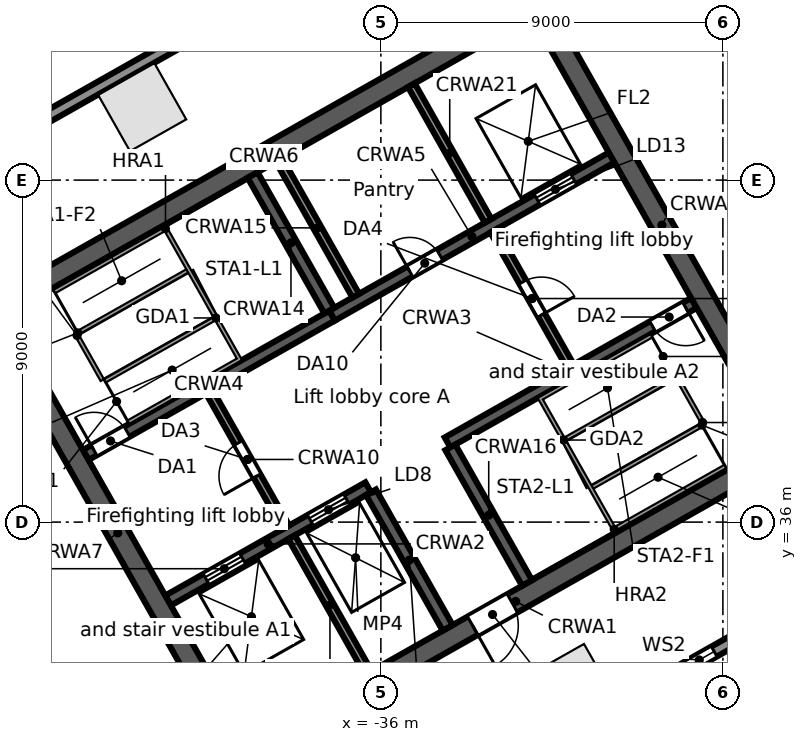
"""IFC4 building model, lengths in metres.
Left out: names, types, materials, properties, quantities, classifications, styles, units other than length and angle.
Written with IfcOpenShell. Run it as: python <this file> out.ifc"""

import sys

from ifc_helpers import new_model, si_unit, direction, frame, frame_2d, origin, origin_2d, place, context, subcontext, project, spatial, rectangle, extrude, element, fill, save


model = new_model("IFC4")
c1 = context("Model", 3, precision=1e-05, world=origin(), true_north=direction((0.0, 1.0)))
c2 = subcontext(c1, "Body", "Model", "MODEL_VIEW")
j1 = project(units=[si_unit("LENGTHUNIT", "METRE"), si_unit("PLANEANGLEUNIT", "RADIAN")], contexts=[c1])
p1 = place(None, origin())
s1 = spatial("IfcSite", under=j1, at=p1, CompositionType="ELEMENT")
p2 = place(p1, origin())
s2 = spatial("IfcBuilding", under=s1, at=p2, CompositionType="ELEMENT")
p3 = place(p2, frame((0.0, 0.0, 97.1)))
s3 = spatial("IfcBuildingStorey", under=s2, at=p3, CompositionType="ELEMENT", Elevation=97.1)
for number, where, z_axis, x_axis in (
    (1, (-42.28, 46.919, 0.0), (0.0, 0.0, 1.0), (-0.87, -0.492, 0.0)),
    (2, (-30.976, 31.635, 0.0), (0.0, 0.0, 1.0), (0.87, 0.492, 0.0)),
):
    element("IfcColumn", number, at=place(p3, frame(where, z_axis=z_axis, x_axis=x_axis)), inside=s3, PredefinedType="COLUMN", context=c2, shape_type="SweptSolid", body=[
        extrude(rectangle(XDim=1.7, YDim=1.7, at=origin_2d()), origin(), (0.0, 0.0, 1.0), 4.4),
    ])
p4 = place(p3, frame((-58.745, 38.764, 0.0), z_axis=(0.0, 0.0, 1.0), x_axis=(0.870355811726, 0.492423355453, 0.0)))
e3 = element("IfcWall", 3, at=p4, inside=s3, PredefinedType="STANDARD", context=c2, shape_type="SweptSolid", body=[
    extrude(rectangle(XDim=64.025, YDim=0.3, at=frame_2d((32.013, 0.0))), origin(), (0.0, 0.0, 1.0), 4.08),
])
p5 = place(p4, frame((60.122, 0.0, 0.6)))
e4 = element("IfcOpeningElement", 4, at=p5, cuts=e3, PredefinedType="OPENING", context=c2, shape_type="SweptSolid", body=[
    extrude(rectangle(XDim=0.9, YDim=2.8, at=frame_2d((0.45, 1.4))), frame((0.0, 0.16, 0.0), z_axis=(0.0, -1.0, 0.0), x_axis=(1.0, 0.0, 0.0)), (0.0, 0.0, 1.0), 0.32),
])
p6 = place(p4, frame((50.992, 0.0, 0.6)))
e5 = element("IfcOpeningElement", 5, at=p6, cuts=e3, PredefinedType="OPENING", context=c2, shape_type="SweptSolid", body=[
    extrude(rectangle(XDim=0.9, YDim=2.8, at=frame_2d((0.45, 1.4))), frame((0.0, 0.16, 0.0), z_axis=(0.0, -1.0, 0.0), x_axis=(1.0, 0.0, 0.0)), (0.0, 0.0, 1.0), 0.32),
])
p7 = place(p4, frame((41.862, 0.0, 0.6)))
e6 = element("IfcOpeningElement", 6, at=p7, cuts=e3, PredefinedType="OPENING", context=c2, shape_type="SweptSolid", body=[
    extrude(rectangle(XDim=0.9, YDim=2.8, at=frame_2d((0.45, 1.4))), frame((0.0, 0.16, 0.0), z_axis=(0.0, -1.0, 0.0), x_axis=(1.0, 0.0, 0.0)), (0.0, 0.0, 1.0), 0.32),
])
p8 = place(p4, frame((32.732, 0.0, 0.6)))
e7 = element("IfcOpeningElement", 7, at=p8, cuts=e3, PredefinedType="OPENING", context=c2, shape_type="SweptSolid", body=[
    extrude(rectangle(XDim=0.9, YDim=2.8, at=frame_2d((0.45, 1.4))), frame((0.0, 0.16, 0.0), z_axis=(0.0, -1.0, 0.0), x_axis=(1.0, 0.0, 0.0)), (0.0, 0.0, 1.0), 0.32),
])
p9 = place(p4, frame((23.602, 0.0, 0.6)))
e8 = element("IfcOpeningElement", 8, at=p9, cuts=e3, PredefinedType="OPENING", context=c2, shape_type="SweptSolid", body=[
    extrude(rectangle(XDim=0.9, YDim=2.8, at=frame_2d((0.45, 1.4))), frame((0.0, 0.16, 0.0), z_axis=(0.0, -1.0, 0.0), x_axis=(1.0, 0.0, 0.0)), (0.0, 0.0, 1.0), 0.32),
])
p10 = place(p4, frame((14.472, 0.0, 0.6)))
e9 = element("IfcOpeningElement", 9, at=p10, cuts=e3, PredefinedType="OPENING", context=c2, shape_type="SweptSolid", body=[
    extrude(rectangle(XDim=0.9, YDim=2.8, at=frame_2d((0.45, 1.4))), frame((0.0, 0.16, 0.0), z_axis=(0.0, -1.0, 0.0), x_axis=(1.0, 0.0, 0.0)), (0.0, 0.0, 1.0), 0.32),
])
p11 = place(p4, frame((5.342, 0.0, 0.6)))
e10 = element("IfcOpeningElement", 10, at=p11, cuts=e3, PredefinedType="OPENING", context=c2, shape_type="SweptSolid", body=[
    extrude(rectangle(XDim=0.9, YDim=2.8, at=frame_2d((0.45, 1.4))), frame((0.0, 0.16, 0.0), z_axis=(0.0, -1.0, 0.0), x_axis=(1.0, 0.0, 0.0)), (0.0, 0.0, 1.0), 0.32),
])
p12 = place(p3, frame((-44.109, 26.504, 0.0), z_axis=(0.0, 0.0, 1.0), x_axis=(-0.857169502585, 0.515034410344, 0.0)))
e11 = element("IfcWall", 11, at=p12, inside=s3, PredefinedType="STANDARD", context=c2, shape_type="SweptSolid", body=[
    extrude(rectangle(XDim=17.127, YDim=0.3, at=frame_2d((8.563, 0.0))), origin(), (0.0, 0.0, 1.0), 4.08),
])
p13 = place(p12, frame((13.403, 0.0, 0.6)))
e12 = element("IfcOpeningElement", 12, at=p13, cuts=e11, PredefinedType="OPENING", context=c2, shape_type="SweptSolid", body=[
    extrude(rectangle(XDim=0.9, YDim=2.8, at=frame_2d((0.45, 1.4))), frame((0.0, 0.16, 0.0), z_axis=(0.0, -1.0, 0.0), x_axis=(1.0, 0.0, 0.0)), (0.0, 0.0, 1.0), 0.32),
])
p14 = place(p12, frame((4.903, 0.0, 0.6)))
e13 = element("IfcOpeningElement", 13, at=p14, cuts=e11, PredefinedType="OPENING", context=c2, shape_type="SweptSolid", body=[
    extrude(rectangle(XDim=0.9, YDim=2.8, at=frame_2d((0.45, 1.4))), frame((0.0, 0.16, 0.0), z_axis=(0.0, -1.0, 0.0), x_axis=(1.0, 0.0, 0.0)), (0.0, 0.0, 1.0), 0.32),
])
p15 = place(p3, frame((-0.055, 47.969, 0.0), z_axis=(0.0, 0.0, 1.0), x_axis=(-0.870355730478, -0.492423499058, 0.0)))
e14 = element("IfcWall", 14, at=p15, inside=s3, PredefinedType="STANDARD", context=c2, shape_type="SweptSolid", body=[
    extrude(rectangle(XDim=43.75, YDim=0.3, at=frame_2d((21.875, 0.0))), origin(), (0.0, 0.0, 1.0), 4.08),
])
p16 = place(p15, frame((39.977, 0.0, 0.6)))
e15 = element("IfcOpeningElement", 15, at=p16, cuts=e14, PredefinedType="OPENING", context=c2, shape_type="SweptSolid", body=[
    extrude(rectangle(XDim=0.9, YDim=2.8, at=frame_2d((0.45, 1.4))), frame((0.0, 0.16, 0.0), z_axis=(0.0, -1.0, 0.0), x_axis=(1.0, 0.0, 0.0)), (0.0, 0.0, 1.0), 0.32),
])
p17 = place(p15, frame((31.222, 0.0, 0.6)))
e16 = element("IfcOpeningElement", 16, at=p17, cuts=e14, PredefinedType="OPENING", context=c2, shape_type="SweptSolid", body=[
    extrude(rectangle(XDim=0.9, YDim=2.8, at=frame_2d((0.45, 1.4))), frame((0.0, 0.16, 0.0), z_axis=(0.0, -1.0, 0.0), x_axis=(1.0, 0.0, 0.0)), (0.0, 0.0, 1.0), 0.32),
])
p18 = place(p15, frame((22.468, 0.0, 0.6)))
e17 = element("IfcOpeningElement", 17, at=p18, cuts=e14, PredefinedType="OPENING", context=c2, shape_type="SweptSolid", body=[
    extrude(rectangle(XDim=0.9, YDim=2.8, at=frame_2d((0.45, 1.4))), frame((0.0, 0.16, 0.0), z_axis=(0.0, -1.0, 0.0), x_axis=(1.0, 0.0, 0.0)), (0.0, 0.0, 1.0), 0.32),
])
p19 = place(p15, frame((13.713, 0.0, 0.6)))
e18 = element("IfcOpeningElement", 18, at=p19, cuts=e14, PredefinedType="OPENING", context=c2, shape_type="SweptSolid", body=[
    extrude(rectangle(XDim=0.9, YDim=2.8, at=frame_2d((0.45, 1.4))), frame((0.0, 0.16, 0.0), z_axis=(0.0, -1.0, 0.0), x_axis=(1.0, 0.0, 0.0)), (0.0, 0.0, 1.0), 0.32),
])
p20 = place(p15, frame((4.959, 0.0, 0.6)))
e19 = element("IfcOpeningElement", 19, at=p20, cuts=e14, PredefinedType="OPENING", context=c2, shape_type="SweptSolid", body=[
    extrude(rectangle(XDim=0.9, YDim=2.8, at=frame_2d((0.45, 1.4))), frame((0.0, 0.16, 0.0), z_axis=(0.0, -1.0, 0.0), x_axis=(1.0, 0.0, 0.0)), (0.0, 0.0, 1.0), 0.32),
])
p21 = place(p3, frame((-39.85, 29.727, 0.0), z_axis=(0.0, 0.0, 1.0), x_axis=(0.870359753402, 0.492416388494, 0.0)))
e20 = element("IfcWall", 20, at=p21, inside=s3, PredefinedType="SOLIDWALL", context=c2, shape_type="SweptSolid", body=[
    extrude(rectangle(XDim=17.0, YDim=0.55, at=frame_2d((8.5, 0.0))), origin(), (0.0, 0.0, 1.0), 4.08),
])
p22 = place(p21, frame((7.2, 0.0, 0.0)))
e21 = element("IfcOpeningElement", 21, at=p22, cuts=e20, PredefinedType="OPENING", context=c2, shape_type="SweptSolid", body=[
    extrude(rectangle(XDim=1.2, YDim=2.1, at=frame_2d((0.6, 1.05))), frame((0.0, 0.285, 0.0), z_axis=(0.0, -1.0, 0.0), x_axis=(1.0, 0.0, 0.0)), (0.0, 0.0, 1.0), 0.57),
])
p23 = place(p3, frame((-41.6, 33.936, 0.0), z_axis=(0.0, 0.0, 1.0), x_axis=(0.870348557882, 0.492436176365, 0.0)))
e22 = element("IfcWall", 22, at=p23, inside=s3, PredefinedType="SOLIDWALL", context=c2, shape_type="SweptSolid", body=[
    extrude(rectangle(XDim=6.05, YDim=0.3, at=frame_2d((3.025, 0.0))), origin(), (0.0, 0.0, 1.0), 4.08),
])
p24 = place(p23, frame((1.15, 0.0, 0.0)))
e23 = element("IfcOpeningElement", 23, at=p24, cuts=e22, PredefinedType="OPENING", context=c2, shape_type="SweptSolid", body=[
    extrude(rectangle(XDim=1.1, YDim=2.1, at=frame_2d((0.55, 1.05))), frame((0.0, 0.16, 0.0), z_axis=(0.0, -1.0, 0.0), x_axis=(1.0, 0.0, 0.0)), (0.0, 0.0, 1.0), 0.32),
])
p25 = place(p23, frame((4.3, 0.0, 0.0)))
e24 = element("IfcOpeningElement", 24, at=p25, cuts=e22, PredefinedType="OPENING", context=c2, shape_type="SweptSolid", body=[
    extrude(rectangle(XDim=1.1, YDim=2.1, at=frame_2d((0.55, 1.05))), frame((0.0, 0.16, 0.0), z_axis=(0.0, -1.0, 0.0), x_axis=(1.0, 0.0, 0.0)), (0.0, 0.0, 1.0), 0.32),
])
p26 = place(p3, frame((-34.245, 38.097, 0.0), z_axis=(0.0, 0.0, 1.0), x_axis=(0.870360741098, 0.49241464271, 0.0)))
e25 = element("IfcWall", 25, at=p26, inside=s3, PredefinedType="SOLIDWALL", context=c2, shape_type="SweptSolid", body=[
    extrude(rectangle(XDim=7.45, YDim=0.3, at=frame_2d((3.725, 0.0))), origin(), (0.0, 0.0, 1.0), 4.08),
])
p27 = place(p26, frame((6.2, 0.0, 0.0)))
e26 = element("IfcOpeningElement", 26, at=p27, cuts=e25, PredefinedType="OPENING", context=c2, shape_type="SweptSolid", body=[
    extrude(rectangle(XDim=1.0, YDim=2.1, at=frame_2d((0.5, 1.05))), frame((0.0, 0.16, 0.0), z_axis=(0.0, -1.0, 0.0), x_axis=(1.0, 0.0, 0.0)), (0.0, 0.0, 1.0), 0.32),
])
p28 = place(p3, frame((-43.766, 37.766, 0.0), z_axis=(0.0, 0.0, 1.0), x_axis=(0.870346696097, 0.492439466932, 0.0)))
e27 = element("IfcWall", 27, at=p28, inside=s3, PredefinedType="SOLIDWALL", context=c2, shape_type="SweptSolid", body=[
    extrude(rectangle(XDim=7.45, YDim=0.3, at=frame_2d((3.725, 0.0))), origin(), (0.0, 0.0, 1.0), 4.08),
])
p29 = place(p28, frame((0.25, 0.0, 0.0)))
e28 = element("IfcOpeningElement", 28, at=p29, cuts=e27, PredefinedType="OPENING", context=c2, shape_type="SweptSolid", body=[
    extrude(rectangle(XDim=1.0, YDim=2.1, at=frame_2d((0.5, 1.05))), frame((0.0, 0.16, 0.0), z_axis=(0.0, -1.0, 0.0), x_axis=(1.0, 0.0, 0.0)), (0.0, 0.0, 1.0), 0.32),
])
p30 = place(p3, frame((-37.282, 41.435, 0.0), z_axis=(0.0, 0.0, 1.0), x_axis=(0.870359895813, 0.492416136779, 0.0)))
e29 = element("IfcWall", 29, at=p30, inside=s3, PredefinedType="SOLIDWALL", context=c2, shape_type="SweptSolid", body=[
    extrude(rectangle(XDim=8.45, YDim=0.3, at=frame_2d((4.225, 0.0))), origin(), (0.0, 0.0, 1.0), 4.08),
])
p31 = place(p30, frame((6.2, 0.0, 0.0)))
e30 = element("IfcOpeningElement", 30, at=p31, cuts=e29, PredefinedType="OPENING", context=c2, shape_type="SweptSolid", body=[
    extrude(rectangle(XDim=1.1, YDim=2.1, at=frame_2d((0.55, 1.05))), frame((0.0, 0.16, 0.0), z_axis=(0.0, -1.0, 0.0), x_axis=(1.0, 0.0, 0.0)), (0.0, 0.0, 1.0), 0.32),
])
p32 = place(p30, frame((2.35, 0.0, 0.0)))
e31 = element("IfcOpeningElement", 31, at=p32, cuts=e29, PredefinedType="OPENING", context=c2, shape_type="SweptSolid", body=[
    extrude(rectangle(XDim=0.9, YDim=2.1, at=frame_2d((0.45, 1.05))), frame((0.0, 0.16, 0.0), z_axis=(0.0, -1.0, 0.0), x_axis=(1.0, 0.0, 0.0)), (0.0, 0.0, 1.0), 0.32),
])
p33 = place(p3, frame((-46.473, 41.434, 0.0), z_axis=(0.0, 0.0, 1.0), x_axis=(0.870359753402, 0.492416388494, 0.0)))
e32 = element("IfcWall", 32, at=p33, inside=s3, PredefinedType="SOLIDWALL", context=c2, shape_type="SweptSolid", body=[
    extrude(rectangle(XDim=17.0, YDim=0.55, at=frame_2d((8.5, 0.0))), origin(), (0.0, 0.0, 1.0), 4.08),
])
p34 = place(p3, frame((-46.098, 41.33, 0.0), z_axis=(0.0, 0.0, 1.0), x_axis=(0.492418910884, -0.870358326325, 0.0)))
e33 = element("IfcWall", 33, at=p34, inside=s3, PredefinedType="SOLIDWALL", context=c2, shape_type="SweptSolid", body=[
    extrude(rectangle(XDim=12.9, YDim=0.55, at=frame_2d((6.45, 0.0))), origin(), (0.0, 0.0, 1.0), 4.08),
])
p35 = place(p3, frame((-38.349, 35.603, 0.0), z_axis=(0.0, 0.0, 1.0), x_axis=(0.492382931784, -0.870378681085, 0.0)))
e34 = element("IfcWall", 34, at=p35, inside=s3, PredefinedType="SOLIDWALL", context=c2, shape_type="SweptSolid", body=[
    extrude(rectangle(XDim=4.1, YDim=0.2, at=frame_2d((2.05, 0.0))), origin(), (0.0, 0.0, 1.0), 4.08),
])
p36 = place(p3, frame((-40.516, 39.433, 0.0), z_axis=(0.0, 0.0, 1.0), x_axis=(0.492453559952, -0.87033872216, 0.0)))
e35 = element("IfcWall", 35, at=p36, inside=s3, PredefinedType="PARTITIONING", context=c2, shape_type="SweptSolid", body=[
    extrude(rectangle(XDim=4.1, YDim=0.2, at=frame_2d((2.05, 0.0))), origin(), (0.0, 0.0, 1.0), 4.08),
])
p37 = place(p36, frame((1.55, 0.0, 0.0)))
e36 = element("IfcOpeningElement", 36, at=p37, cuts=e35, PredefinedType="OPENING", context=c2, shape_type="SweptSolid", body=[
    extrude(rectangle(XDim=1.0, YDim=2.1, at=frame_2d((0.5, 1.05))), frame((0.0, 0.11, 0.0), z_axis=(0.0, -1.0, 0.0), x_axis=(1.0, 0.0, 0.0)), (0.0, 0.0, 1.0), 0.22),
])
p38 = place(p3, frame((-36.26, 36.785, 0.0), z_axis=(0.0, 0.0, 1.0), x_axis=(0.492408451753, -0.87036424366, 0.0)))
e37 = element("IfcWall", 37, at=p38, inside=s3, PredefinedType="SOLIDWALL", context=c2, shape_type="SweptSolid", body=[
    extrude(rectangle(XDim=4.1, YDim=0.3, at=frame_2d((2.05, 0.0))), origin(), (0.0, 0.0, 1.0), 4.08),
])
p39 = place(p3, frame((-39.375, 45.134, 0.0), z_axis=(0.0, 0.0, 1.0), x_axis=(0.492428039142, -0.870353161807, 0.0)))
e38 = element("IfcWall", 38, at=p39, inside=s3, PredefinedType="SOLIDWALL", context=c2, shape_type="SweptSolid", body=[
    extrude(rectangle(XDim=4.1, YDim=0.3, at=frame_2d((2.05, 0.0))), origin(), (0.0, 0.0, 1.0), 4.08),
])
p40 = place(p3, frame((-38.679, 45.527, 0.0), z_axis=(0.0, 0.0, 1.0), x_axis=(0.492453559952, -0.87033872216, 0.0)))
e39 = element("IfcWall", 39, at=p40, inside=s3, PredefinedType="SOLIDWALL", context=c2, shape_type="SweptSolid", body=[
    extrude(rectangle(XDim=4.1, YDim=0.2, at=frame_2d((2.05, 0.0))), origin(), (0.0, 0.0, 1.0), 4.08),
])
p41 = place(p3, frame((-34.171, 37.967, 0.0), z_axis=(0.0, 0.0, 1.0), x_axis=(0.492382931784, -0.870378681085, 0.0)))
e40 = element("IfcWall", 40, at=p41, inside=s3, PredefinedType="SOLIDWALL", context=c2, shape_type="SweptSolid", body=[
    extrude(rectangle(XDim=4.1, YDim=0.3, at=frame_2d((2.05, 0.0))), origin(), (0.0, 0.0, 1.0), 4.08),
])
p42 = place(p3, frame((-33.031, 43.667, 0.0), z_axis=(0.0, 0.0, 1.0), x_axis=(0.492408451753, -0.87036424366, 0.0)))
e41 = element("IfcWall", 41, at=p42, inside=s3, PredefinedType="PARTITIONING", context=c2, shape_type="SweptSolid", body=[
    extrude(rectangle(XDim=4.1, YDim=0.2, at=frame_2d((2.05, 0.0))), origin(), (0.0, 0.0, 1.0), 4.08),
])
p43 = place(p42, frame((1.55, 0.0, 0.0)))
e42 = element("IfcOpeningElement", 42, at=p43, cuts=e41, PredefinedType="OPENING", context=c2, shape_type="SweptSolid", body=[
    extrude(rectangle(XDim=1.0, YDim=2.1, at=frame_2d((0.5, 1.05))), frame((0.0, 0.11, 0.0), z_axis=(0.0, -1.0, 0.0), x_axis=(1.0, 0.0, 0.0)), (0.0, 0.0, 1.0), 0.22),
])
p44 = place(p3, frame((-35.197, 47.497, 0.0), z_axis=(0.0, 0.0, 1.0), x_axis=(0.492453559952, -0.87033872216, 0.0)))
e43 = element("IfcWall", 43, at=p44, inside=s3, PredefinedType="SOLIDWALL", context=c2, shape_type="SweptSolid", body=[
    extrude(rectangle(XDim=4.1, YDim=0.2, at=frame_2d((2.05, 0.0))), origin(), (0.0, 0.0, 1.0), 4.08),
])
p45 = place(p3, frame((-31.781, 49.43, 0.0), z_axis=(0.0, 0.0, 1.0), x_axis=(0.492427022044, -0.870353737259, 0.0)))
e44 = element("IfcWall", 44, at=p45, inside=s3, PredefinedType="SOLIDWALL", context=c2, shape_type="SweptSolid", body=[
    extrude(rectangle(XDim=12.9, YDim=0.55, at=frame_2d((6.45, 0.0))), origin(), (0.0, 0.0, 1.0), 4.08),
])
p46 = place(p3, frame((-28.799, 55.534, 0.0), z_axis=(0.0, 0.0, 1.0), x_axis=(0.488587464104, -0.872514922463, 0.0)))
e45 = element("IfcWall", 45, at=p46, inside=s3, PredefinedType="PARTITIONING", context=c2, shape_type="SweptSolid", body=[
    extrude(rectangle(XDim=17.295, YDim=0.125, at=frame_2d((8.647, 0.0))), origin(), (0.0, 0.0, 1.0), 3.148),
])
p47 = place(p17, origin())
e46 = element("IfcWindow", 46, at=p47, inside=s3, PartitioningType="SINGLE_PANEL", PredefinedType="WINDOW", context=c2, shape_type="SweptSolid", body=[
    extrude(rectangle(XDim=0.9, YDim=2.8, at=frame_2d((0.45, 1.4))), frame((0.0, 0.03, 0.0), z_axis=(0.0, -1.0, 0.0), x_axis=(1.0, 0.0, 0.0)), (0.0, 0.0, 1.0), 0.06),
])
fill(e16, e46)
p48 = place(p31, origin())
e47 = element("IfcDoor", 47, at=p48, inside=s3, OperationType="DOUBLE_DOOR_SLIDING", PredefinedType="DOOR", context=c2, shape_type="SweptSolid", body=[
    extrude(rectangle(XDim=1.1, YDim=2.1, at=frame_2d((0.55, 1.05))), frame((0.0, 0.025, 0.0), z_axis=(0.0, -1.0, 0.0), x_axis=(1.0, 0.0, 0.0)), (0.0, 0.0, 1.0), 0.05),
])
fill(e30, e47)
p49 = place(p24, origin())
e48 = element("IfcDoor", 48, at=p49, inside=s3, OperationType="DOUBLE_DOOR_SLIDING", PredefinedType="DOOR", context=c2, shape_type="SweptSolid", body=[
    extrude(rectangle(XDim=1.1, YDim=2.1, at=frame_2d((0.55, 1.05))), frame((0.0, 0.025, 0.0), z_axis=(0.0, -1.0, 0.0), x_axis=(1.0, 0.0, 0.0)), (0.0, 0.0, 1.0), 0.05),
])
fill(e23, e48)
p50 = place(p25, origin())
e49 = element("IfcDoor", 49, at=p50, inside=s3, OperationType="DOUBLE_DOOR_SLIDING", PredefinedType="DOOR", context=c2, shape_type="SweptSolid", body=[
    extrude(rectangle(XDim=1.1, YDim=2.1, at=frame_2d((0.55, 1.05))), frame((0.0, 0.025, 0.0), z_axis=(0.0, -1.0, 0.0), x_axis=(1.0, 0.0, 0.0)), (0.0, 0.0, 1.0), 0.05),
])
fill(e24, e49)
p51 = place(p29, origin())
e50 = element("IfcDoor", 50, at=p51, inside=s3, OperationType="SINGLE_SWING_LEFT", PredefinedType="DOOR", context=c2, shape_type="SweptSolid", body=[
    extrude(rectangle(XDim=1.0, YDim=2.1, at=frame_2d((0.5, 1.05))), frame((0.0, 0.025, 0.0), z_axis=(0.0, -1.0, 0.0), x_axis=(1.0, 0.0, 0.0)), (0.0, 0.0, 1.0), 0.05),
])
fill(e28, e50)
p52 = place(p27, frame((1.0, 0.0, 0.0), z_axis=(0.0, 0.0, 1.0), x_axis=(-1.0, 0.0, 0.0)))
e51 = element("IfcDoor", 51, at=p52, inside=s3, OperationType="SINGLE_SWING_LEFT", PredefinedType="DOOR", context=c2, shape_type="SweptSolid", body=[
    extrude(rectangle(XDim=1.0, YDim=2.1, at=frame_2d((0.5, 1.05))), frame((0.0, 0.025, 0.0), z_axis=(0.0, -1.0, 0.0), x_axis=(1.0, 0.0, 0.0)), (0.0, 0.0, 1.0), 0.05),
])
fill(e26, e51)
p53 = place(p37, frame((1.0, 0.0, 0.0), z_axis=(0.0, 0.0, 1.0), x_axis=(-1.0, 0.0, 0.0)))
e52 = element("IfcDoor", 52, at=p53, inside=s3, OperationType="SINGLE_SWING_LEFT", PredefinedType="DOOR", context=c2, shape_type="SweptSolid", body=[
    extrude(rectangle(XDim=1.0, YDim=2.1, at=frame_2d((0.5, 1.05))), frame((0.0, 0.025, 0.0), z_axis=(0.0, -1.0, 0.0), x_axis=(1.0, 0.0, 0.0)), (0.0, 0.0, 1.0), 0.05),
])
fill(e36, e52)
p54 = place(p43, origin())
e53 = element("IfcDoor", 53, at=p54, inside=s3, OperationType="SINGLE_SWING_RIGHT", PredefinedType="DOOR", context=c2, shape_type="SweptSolid", body=[
    extrude(rectangle(XDim=1.0, YDim=2.1, at=frame_2d((0.5, 1.05))), frame((0.0, 0.025, 0.0), z_axis=(0.0, -1.0, 0.0), x_axis=(1.0, 0.0, 0.0)), (0.0, 0.0, 1.0), 0.05),
])
fill(e42, e53)
p55 = place(p22, frame((1.2, 0.0, 0.0), z_axis=(0.0, 0.0, 1.0), x_axis=(-1.0, 0.0, 0.0)))
e54 = element("IfcDoor", 54, at=p55, inside=s3, OperationType="SINGLE_SWING_RIGHT", PredefinedType="DOOR", context=c2, shape_type="SweptSolid", body=[
    extrude(rectangle(XDim=1.2, YDim=2.1, at=frame_2d((0.6, 1.05))), frame((0.0, 0.025, 0.0), z_axis=(0.0, -1.0, 0.0), x_axis=(1.0, 0.0, 0.0)), (0.0, 0.0, 1.0), 0.05),
])
fill(e21, e54)
p56 = place(p32, origin())
e55 = element("IfcDoor", 55, at=p56, inside=s3, OperationType="SINGLE_SWING_LEFT", PredefinedType="DOOR", context=c2, shape_type="SweptSolid", body=[
    extrude(rectangle(XDim=0.9, YDim=2.1, at=frame_2d((0.45, 1.05))), frame((0.0, 0.025, 0.0), z_axis=(0.0, -1.0, 0.0), x_axis=(1.0, 0.0, 0.0)), (0.0, 0.0, 1.0), 0.05),
])
fill(e31, e55)
save(model, sys.argv[1])
